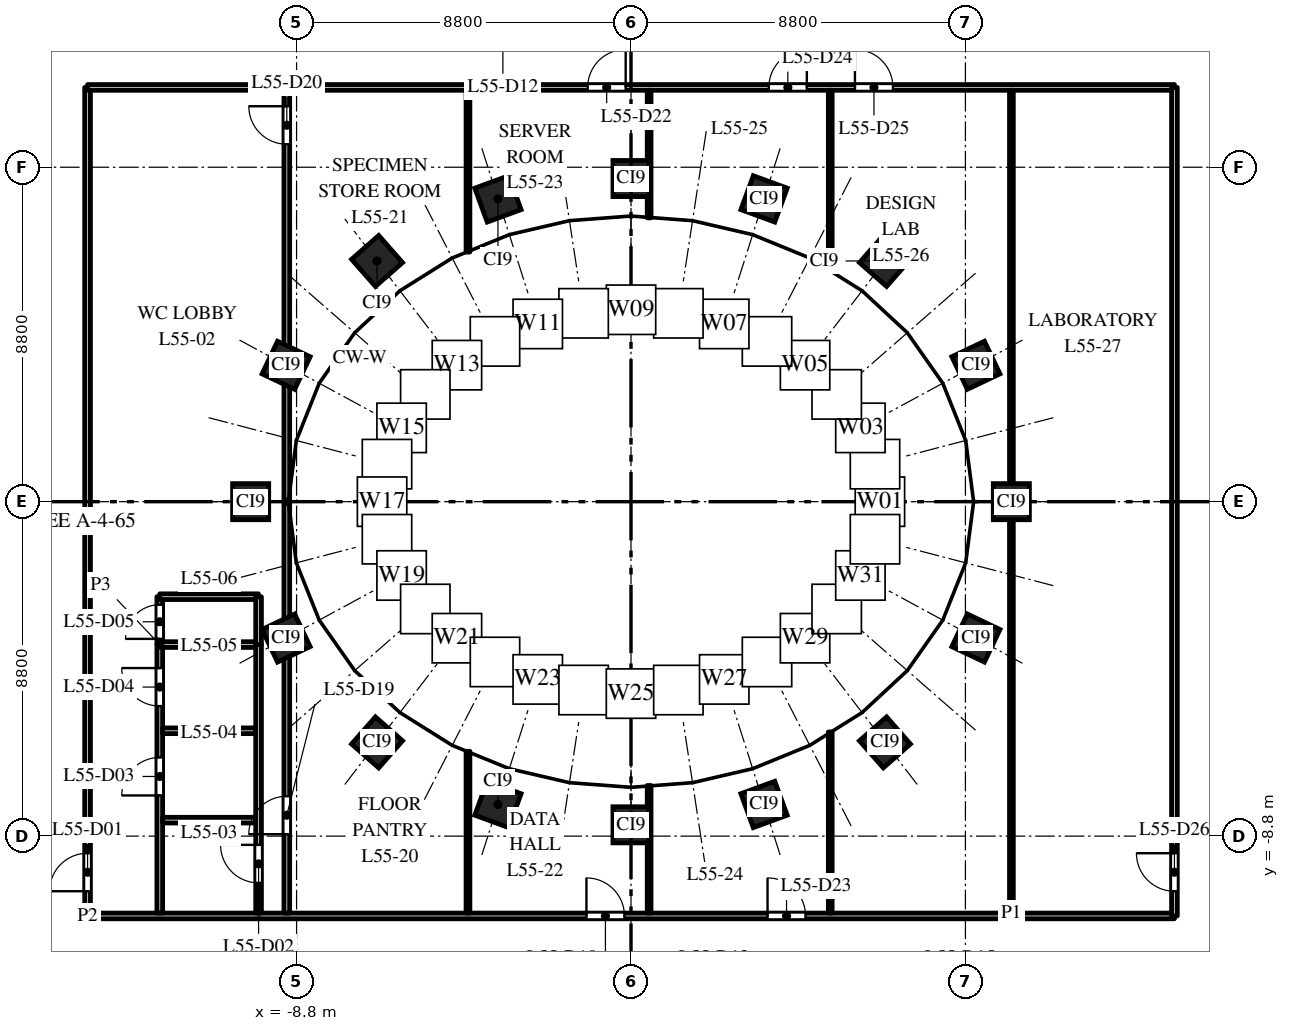
"""IFC4 building model, lengths in metres.
Left out: names, types, materials, properties, quantities, classifications, styles, units other than length and angle.
Written with IfcOpenShell. Run it as: python <this file> out.ifc"""

import sys

from ifc_helpers import new_model, si_unit, direction, frame, frame_2d, origin, origin_2d, place, context, subcontext, project, spatial, rectangle, extrude, element, fill, save


model = new_model("IFC4")
c1 = context("Model", 3, precision=1e-05, world=origin(), true_north=direction((0.0, 1.0)))
c2 = subcontext(c1, "Body", "Model", "MODEL_VIEW")
j1 = project(units=[si_unit("LENGTHUNIT", "METRE"), si_unit("PLANEANGLEUNIT", "RADIAN")], contexts=[c1])
p1 = place(None, origin())
s1 = spatial("IfcSite", under=j1, at=p1, CompositionType="ELEMENT")
p2 = place(p1, origin())
s2 = spatial("IfcBuilding", under=s1, at=p2, CompositionType="ELEMENT")
p3 = place(p2, frame((0.0, 0.0, 261.5)))
s3 = spatial("IfcBuildingStorey", under=s2, at=p3, CompositionType="ELEMENT", Elevation=261.5)
for number, where, z_axis, x_axis in (
    (1, (10.008, 0.0, 0.0), (0.0, 0.0, 1.0), (0.0, 1.0, 0.0)),
    (2, (9.076, 3.588, 0.0), (0.0, 0.0, 1.0), (-0.429, 0.903, 0.0)),
    (3, (6.682, 6.334, 0.0), (0.0, 0.0, 1.0), (-0.751, 0.66, 0.0)),
    (4, (3.501, 7.967, 0.0), (0.0, 0.0, 1.0), (-0.939, 0.344, 0.0)),
    (5, (0.0, 8.503, 0.0), (0.0, 0.0, 1.0), (-1.0, 0.0, 0.0)),
    (6, (-3.501, 7.967, 0.0), (0.0, 0.0, 1.0), (-0.939, -0.344, 0.0)),
    (7, (-6.682, 6.334, 0.0), (0.0, 0.0, 1.0), (-0.751, -0.66, 0.0)),
    (8, (-9.076, 3.588, 0.0), (0.0, 0.0, 1.0), (-0.429, -0.903, 0.0)),
    (9, (-10.008, 0.0, 0.0), (0.0, 0.0, 1.0), (0.0, -1.0, 0.0)),
    (10, (-9.076, -3.588, 0.0), (0.0, 0.0, 1.0), (0.429, -0.903, 0.0)),
    (11, (-6.682, -6.334, 0.0), (0.0, 0.0, 1.0), (0.751, -0.66, 0.0)),
    (12, (-3.501, -7.967, 0.0), (0.0, 0.0, 1.0), (0.939, -0.344, 0.0)),
    (13, (0.0, -8.503, 0.0), (0.0, 0.0, 1.0), (1.0, 0.0, 0.0)),
    (14, (3.501, -7.967, 0.0), (0.0, 0.0, 1.0), (0.939, 0.344, 0.0)),
    (15, (6.682, -6.334, 0.0), (0.0, 0.0, 1.0), (0.751, 0.66, 0.0)),
    (16, (9.076, -3.588, 0.0), (0.0, 0.0, 1.0), (0.429, 0.903, 0.0)),
):
    element("IfcColumn", number, at=place(p3, frame(where, z_axis=z_axis, x_axis=x_axis)), inside=s3, PredefinedType="COLUMN", context=c2, shape_type="SweptSolid", body=[
        extrude(rectangle(XDim=0.95, YDim=0.95, at=origin_2d()), origin(), (0.0, 0.0, 1.0), 4.0),
    ])
p4 = place(p3, frame((-14.3, -10.9, 0.0), z_axis=(0.0, 0.0, 1.0), x_axis=(0.0, 1.0, 0.0)))
e17 = element("IfcWall", 17, at=p4, inside=s3, PredefinedType="PARTITIONING", context=c2, shape_type="SweptSolid", body=[
    extrude(rectangle(XDim=21.8, YDim=0.15, at=frame_2d((10.9, 0.0))), origin(), (0.0, 0.0, 1.0), 2.75),
])
p5 = place(p4, frame((0.65, 0.0, 0.0)))
e18 = element("IfcOpeningElement", 18, at=p5, cuts=e17, PredefinedType="OPENING", context=c2, shape_type="SweptSolid", body=[
    extrude(rectangle(XDim=1.0, YDim=2.1, at=frame_2d((0.5, 1.05))), frame((0.0, 0.085, 0.0), z_axis=(0.0, -1.0, 0.0), x_axis=(1.0, 0.0, 0.0)), (0.0, 0.0, 1.0), 0.17),
])
p6 = place(p3, frame((-14.3, -10.9, 0.0), z_axis=(0.0, 0.0, 1.0), x_axis=(1.0, 0.0, 0.0)))
e19 = element("IfcWall", 19, at=p6, inside=s3, PredefinedType="PARTITIONING", context=c2, shape_type="SweptSolid", body=[
    extrude(rectangle(XDim=28.6, YDim=0.15, at=frame_2d((14.3, 0.0))), origin(), (0.0, 0.0, 1.0), 2.85),
])
p7 = place(p6, frame((13.127, 0.0, 0.0)))
e20 = element("IfcOpeningElement", 20, at=p7, cuts=e19, PredefinedType="OPENING", context=c2, shape_type="SweptSolid", body=[
    extrude(rectangle(XDim=1.0, YDim=2.1, at=frame_2d((0.5, 1.05))), frame((0.0, 0.085, 0.0), z_axis=(0.0, -1.0, 0.0), x_axis=(1.0, 0.0, 0.0)), (0.0, 0.0, 1.0), 0.17),
])
p8 = place(p6, frame((17.893, 0.0, 0.0)))
e21 = element("IfcOpeningElement", 21, at=p8, cuts=e19, PredefinedType="OPENING", context=c2, shape_type="SweptSolid", body=[
    extrude(rectangle(XDim=1.0, YDim=2.1, at=frame_2d((0.5, 1.05))), frame((0.0, 0.085, 0.0), z_axis=(0.0, -1.0, 0.0), x_axis=(1.0, 0.0, 0.0)), (0.0, 0.0, 1.0), 0.17),
])
p9 = place(p3, frame((-14.3, 10.9, 0.0), z_axis=(0.0, 0.0, 1.0), x_axis=(1.0, 0.0, 0.0)))
e22 = element("IfcWall", 22, at=p9, inside=s3, PredefinedType="PARTITIONING", context=c2, shape_type="SweptSolid", body=[
    extrude(rectangle(XDim=28.6, YDim=0.15, at=frame_2d((14.3, 0.0))), origin(), (0.0, 0.0, 1.0), 2.85),
])
p10 = place(p9, frame((13.16, 0.0, 0.0)))
e23 = element("IfcOpeningElement", 23, at=p10, cuts=e22, PredefinedType="OPENING", context=c2, shape_type="SweptSolid", body=[
    extrude(rectangle(XDim=1.0, YDim=2.1, at=frame_2d((0.5, 1.05))), frame((0.0, 0.085, 0.0), z_axis=(0.0, -1.0, 0.0), x_axis=(1.0, 0.0, 0.0)), (0.0, 0.0, 1.0), 0.17),
])
p11 = place(p9, frame((17.927, 0.0, 0.0)))
e24 = element("IfcOpeningElement", 24, at=p11, cuts=e22, PredefinedType="OPENING", context=c2, shape_type="SweptSolid", body=[
    extrude(rectangle(XDim=1.0, YDim=2.1, at=frame_2d((0.5, 1.05))), frame((0.0, 0.085, 0.0), z_axis=(0.0, -1.0, 0.0), x_axis=(1.0, 0.0, 0.0)), (0.0, 0.0, 1.0), 0.17),
])
p12 = place(p9, frame((20.193, 0.0, 0.0)))
e25 = element("IfcOpeningElement", 25, at=p12, cuts=e22, PredefinedType="OPENING", context=c2, shape_type="SweptSolid", body=[
    extrude(rectangle(XDim=1.0, YDim=2.1, at=frame_2d((0.5, 1.05))), frame((0.0, 0.085, 0.0), z_axis=(0.0, -1.0, 0.0), x_axis=(1.0, 0.0, 0.0)), (0.0, 0.0, 1.0), 0.17),
])
p13 = place(p3, frame((-12.4, -10.825, 0.0), z_axis=(0.0, 0.0, 1.0), x_axis=(0.0, 1.0, 0.0)))
e26 = element("IfcWall", 26, at=p13, inside=s3, PredefinedType="PARTITIONING", context=c2, shape_type="SweptSolid", body=[
    extrude(rectangle(XDim=7.065, YDim=0.15, at=frame_2d((3.532, 0.0))), origin(), (0.0, 0.0, 1.0), 2.75),
])
p14 = place(p13, frame((3.095, 0.0, 0.0)))
e27 = element("IfcOpeningElement", 27, at=p14, cuts=e26, PredefinedType="OPENING", context=c2, shape_type="SweptSolid", body=[
    extrude(rectangle(XDim=1.0, YDim=2.1, at=frame_2d((0.5, 1.05))), frame((0.0, 0.085, 0.0), z_axis=(0.0, -1.0, 0.0), x_axis=(1.0, 0.0, 0.0)), (0.0, 0.0, 1.0), 0.17),
])
p15 = place(p13, frame((5.447, 0.0, 0.0)))
e28 = element("IfcOpeningElement", 28, at=p15, cuts=e26, PredefinedType="OPENING", context=c2, shape_type="SweptSolid", body=[
    extrude(rectangle(XDim=1.0, YDim=2.1, at=frame_2d((0.5, 1.05))), frame((0.0, 0.085, 0.0), z_axis=(0.0, -1.0, 0.0), x_axis=(1.0, 0.0, 0.0)), (0.0, 0.0, 1.0), 0.17),
])
p16 = place(p3, frame((-12.325, -8.38, 0.0), z_axis=(0.0, 0.0, 1.0), x_axis=(1.0, 0.0, 0.0)))
e29 = element("IfcWall", 29, at=p16, inside=s3, PredefinedType="PARTITIONING", context=c2, shape_type="SweptSolid", body=[
    extrude(rectangle(XDim=2.45, YDim=0.15, at=frame_2d((1.225, 0.0))), origin(), (0.0, 0.0, 1.0), 2.75),
])
p17 = place(p3, frame((-12.325, -6.028, 0.0), z_axis=(0.0, 0.0, 1.0), x_axis=(1.0, 0.0, 0.0)))
e30 = element("IfcWall", 30, at=p17, inside=s3, PredefinedType="PARTITIONING", context=c2, shape_type="SweptSolid", body=[
    extrude(rectangle(XDim=2.45, YDim=0.15, at=frame_2d((1.225, 0.0))), origin(), (0.0, 0.0, 1.0), 3.7),
])
p18 = place(p3, frame((-12.4, -3.76, 0.0), z_axis=(0.0, 0.0, 1.0), x_axis=(0.0, 1.0, 0.0)))
e31 = element("IfcWall", 31, at=p18, inside=s3, PredefinedType="PARTITIONING", context=c2, shape_type="SweptSolid", body=[
    extrude(rectangle(XDim=1.26, YDim=0.15, at=frame_2d((0.63, 0.0))), origin(), (0.0, 0.0, 1.0), 3.7),
])
p19 = place(p18, frame((0.15, 0.0, 0.0)))
e32 = element("IfcOpeningElement", 32, at=p19, cuts=e31, PredefinedType="OPENING", context=c2, shape_type="SweptSolid", body=[
    extrude(rectangle(XDim=0.9, YDim=2.1, at=frame_2d((0.45, 1.05))), frame((0.0, 0.085, 0.0), z_axis=(0.0, -1.0, 0.0), x_axis=(1.0, 0.0, 0.0)), (0.0, 0.0, 1.0), 0.17),
])
p20 = place(p3, frame((-12.4, -3.76, 0.0), z_axis=(0.0, 0.0, 1.0), x_axis=(1.0, 0.0, 0.0)))
e33 = element("IfcWall", 33, at=p20, inside=s3, PredefinedType="PARTITIONING", context=c2, shape_type="SweptSolid", body=[
    extrude(rectangle(XDim=2.6, YDim=0.15, at=frame_2d((1.3, 0.0))), origin(), (0.0, 0.0, 1.0), 3.7),
])
p21 = place(p3, frame((-12.4, -2.5, 0.0), z_axis=(0.0, 0.0, 1.0), x_axis=(1.0, 0.0, 0.0)))
e34 = element("IfcWall", 34, at=p21, inside=s3, PredefinedType="PARTITIONING", context=c2, shape_type="SweptSolid", body=[
    extrude(rectangle(XDim=2.596, YDim=0.15, at=frame_2d((1.298, 0.0))), origin(), (0.0, 0.0, 1.0), 3.7),
])
p22 = place(p3, frame((-9.8, -10.825, 0.0), z_axis=(0.0, 0.0, 1.0), x_axis=(0.0, 1.0, 0.0)))
e35 = element("IfcWall", 35, at=p22, inside=s3, PredefinedType="PARTITIONING", context=c2, shape_type="SweptSolid", body=[
    extrude(rectangle(XDim=7.065, YDim=0.15, at=frame_2d((3.532, 0.0))), origin(), (0.0, 0.0, 1.0), 2.75),
])
p23 = place(p22, frame((0.795, 0.0, 0.0)))
e36 = element("IfcOpeningElement", 36, at=p23, cuts=e35, PredefinedType="OPENING", context=c2, shape_type="SweptSolid", body=[
    extrude(rectangle(XDim=1.0, YDim=2.1, at=frame_2d((0.5, 1.05))), frame((0.0, 0.085, 0.0), z_axis=(0.0, -1.0, 0.0), x_axis=(1.0, 0.0, 0.0)), (0.0, 0.0, 1.0), 0.17),
])
p24 = place(p3, frame((-9.8, -3.76, 0.0), z_axis=(0.0, 0.0, 1.0), x_axis=(0.0, 1.0, 0.0)))
e37 = element("IfcWall", 37, at=p24, inside=s3, PredefinedType="PARTITIONING", context=c2, shape_type="SweptSolid", body=[
    extrude(rectangle(XDim=1.256, YDim=0.15, at=frame_2d((0.628, 0.0))), origin(), (0.0, 0.0, 1.0), 3.7),
])
p25 = place(p3, frame((-9.057, -10.825, 0.0), z_axis=(0.0, 0.0, 1.0), x_axis=(0.0, 1.0, 0.0)))
e38 = element("IfcWall", 38, at=p25, inside=s3, PredefinedType="PARTITIONING", context=c2, shape_type="SweptSolid", body=[
    extrude(rectangle(XDim=10.78, YDim=0.15, at=frame_2d((5.39, 0.0))), origin(), (0.0, 0.0, 1.0), 2.75),
])
p26 = place(p25, frame((2.075, 0.0, 0.0)))
e39 = element("IfcOpeningElement", 39, at=p26, cuts=e38, PredefinedType="OPENING", context=c2, shape_type="SweptSolid", body=[
    extrude(rectangle(XDim=1.0, YDim=2.1, at=frame_2d((0.5, 1.05))), frame((0.0, 0.085, 0.0), z_axis=(0.0, -1.0, 0.0), x_axis=(1.0, 0.0, 0.0)), (0.0, 0.0, 1.0), 0.17),
])
p27 = place(p3, frame((-9.057, 0.045, 0.0), z_axis=(0.0, 0.0, 1.0), x_axis=(0.0, 1.0, 0.0)))
e40 = element("IfcWall", 40, at=p27, inside=s3, PredefinedType="PARTITIONING", context=c2, shape_type="SweptSolid", body=[
    extrude(rectangle(XDim=10.78, YDim=0.15, at=frame_2d((5.39, 0.0))), origin(), (0.0, 0.0, 1.0), 2.75),
])
p28 = place(p27, frame((9.36, 0.0, 0.0)))
e41 = element("IfcOpeningElement", 41, at=p28, cuts=e40, PredefinedType="OPENING", context=c2, shape_type="SweptSolid", body=[
    extrude(rectangle(XDim=1.0, YDim=2.1, at=frame_2d((0.5, 1.05))), frame((0.0, 0.085, 0.0), z_axis=(0.0, -1.0, 0.0), x_axis=(1.0, 0.0, 0.0)), (0.0, 0.0, 1.0), 0.17),
])
for number, where, z_axis, x_axis in (
    (42, (-4.29, -10.825, 0.0), (0.0, 0.0, 1.0), (0.0, 1.0, 0.0)),
    (43, (-4.29, 6.568, 0.0), (0.0, 0.0, 1.0), (0.0, 1.0, 0.0)),
):
    element("IfcWall", number, at=place(p3, frame(where, z_axis=z_axis, x_axis=x_axis)), inside=s3, PredefinedType="PARTITIONING", context=c2, shape_type="SweptSolid", body=[
        extrude(rectangle(XDim=4.257, YDim=0.1, at=frame_2d((2.128, 0.0))), origin(), (0.0, 0.0, 1.0), 2.85),
    ])
for number, where, z_axis, x_axis in (
    (44, (0.477, -10.825, 0.0), (0.0, 0.0, 1.0), (0.0, 1.0, 0.0)),
    (45, (0.477, 7.468, 0.0), (0.0, 0.0, 1.0), (0.0, 1.0, 0.0)),
):
    element("IfcWall", number, at=place(p3, frame(where, z_axis=z_axis, x_axis=x_axis)), inside=s3, PredefinedType="PARTITIONING", context=c2, shape_type="SweptSolid", body=[
        extrude(rectangle(XDim=3.357, YDim=0.1, at=frame_2d((1.678, 0.0))), origin(), (0.0, 0.0, 1.0), 3.0),
    ])
for number, where, z_axis, x_axis in (
    (46, (5.243, -10.825, 0.0), (0.0, 0.0, 1.0), (0.0, 1.0, 0.0)),
    (47, (5.243, 6.059, 0.0), (0.0, 0.0, 1.0), (0.0, 1.0, 0.0)),
):
    element("IfcWall", number, at=place(p3, frame(where, z_axis=z_axis, x_axis=x_axis)), inside=s3, PredefinedType="PARTITIONING", context=c2, shape_type="SweptSolid", body=[
        extrude(rectangle(XDim=4.766, YDim=0.1, at=frame_2d((2.383, 0.0))), origin(), (0.0, 0.0, 1.0), 2.85),
    ])
p29 = place(p3, frame((10.01, -10.825, 0.0), z_axis=(0.0, 0.0, 1.0), x_axis=(0.0, 1.0, 0.0)))
e48 = element("IfcWall", 48, at=p29, inside=s3, PredefinedType="PARTITIONING", context=c2, shape_type="SweptSolid", body=[
    extrude(rectangle(XDim=21.65, YDim=0.1, at=frame_2d((10.825, 0.0))), origin(), (0.0, 0.0, 1.0), 2.75),
])
p30 = place(p3, frame((14.3, -10.9, 0.0), z_axis=(0.0, 0.0, 1.0), x_axis=(0.0, 1.0, 0.0)))
e49 = element("IfcWall", 49, at=p30, inside=s3, PredefinedType="PARTITIONING", context=c2, shape_type="SweptSolid", body=[
    extrude(rectangle(XDim=21.8, YDim=0.15, at=frame_2d((10.9, 0.0))), origin(), (0.0, 0.0, 1.0), 2.75),
])
p31 = place(p30, frame((0.65, 0.0, 0.0)))
e50 = element("IfcOpeningElement", 50, at=p31, cuts=e49, PredefinedType="OPENING", context=c2, shape_type="SweptSolid", body=[
    extrude(rectangle(XDim=1.0, YDim=2.1, at=frame_2d((0.5, 1.05))), frame((0.0, 0.085, 0.0), z_axis=(0.0, -1.0, 0.0), x_axis=(1.0, 0.0, 0.0)), (0.0, 0.0, 1.0), 0.17),
])
p32 = place(p5, origin())
e51 = element("IfcDoor", 51, at=p32, inside=s3, OperationType="SINGLE_SWING_LEFT", PredefinedType="DOOR", context=c2, shape_type="SweptSolid", body=[
    extrude(rectangle(XDim=1.0, YDim=2.1, at=frame_2d((0.5, 1.05))), frame((0.0, 0.025, 0.0), z_axis=(0.0, -1.0, 0.0), x_axis=(1.0, 0.0, 0.0)), (0.0, 0.0, 1.0), 0.05),
])
fill(e18, e51)
p33 = place(p23, origin())
e52 = element("IfcDoor", 52, at=p33, inside=s3, OperationType="SINGLE_SWING_RIGHT", PredefinedType="DOOR", context=c2, shape_type="SweptSolid", body=[
    extrude(rectangle(XDim=1.0, YDim=2.1, at=frame_2d((0.5, 1.05))), frame((0.0, 0.025, 0.0), z_axis=(0.0, -1.0, 0.0), x_axis=(1.0, 0.0, 0.0)), (0.0, 0.0, 1.0), 0.05),
])
fill(e36, e52)
p34 = place(p14, origin())
e53 = element("IfcDoor", 53, at=p34, inside=s3, OperationType="SINGLE_SWING_LEFT", PredefinedType="DOOR", context=c2, shape_type="SweptSolid", body=[
    extrude(rectangle(XDim=1.0, YDim=2.1, at=frame_2d((0.5, 1.05))), frame((0.0, 0.025, 0.0), z_axis=(0.0, -1.0, 0.0), x_axis=(1.0, 0.0, 0.0)), (0.0, 0.0, 1.0), 0.05),
])
fill(e27, e53)
p35 = place(p15, origin())
e54 = element("IfcDoor", 54, at=p35, inside=s3, OperationType="SINGLE_SWING_RIGHT", PredefinedType="DOOR", context=c2, shape_type="SweptSolid", body=[
    extrude(rectangle(XDim=1.0, YDim=2.1, at=frame_2d((0.5, 1.05))), frame((0.0, 0.025, 0.0), z_axis=(0.0, -1.0, 0.0), x_axis=(1.0, 0.0, 0.0)), (0.0, 0.0, 1.0), 0.05),
])
fill(e28, e54)
p36 = place(p19, origin())
e55 = element("IfcDoor", 55, at=p36, inside=s3, OperationType="SINGLE_SWING_LEFT", PredefinedType="DOOR", context=c2, shape_type="SweptSolid", body=[
    extrude(rectangle(XDim=0.9, YDim=2.1, at=frame_2d((0.45, 1.05))), frame((0.0, 0.025, 0.0), z_axis=(0.0, -1.0, 0.0), x_axis=(1.0, 0.0, 0.0)), (0.0, 0.0, 1.0), 0.05),
])
fill(e32, e55)
p37 = place(p26, origin())
e56 = element("IfcDoor", 56, at=p37, inside=s3, OperationType="SINGLE_SWING_LEFT", PredefinedType="DOOR", context=c2, shape_type="SweptSolid", body=[
    extrude(rectangle(XDim=1.0, YDim=2.1, at=frame_2d((0.5, 1.05))), frame((0.0, 0.025, 0.0), z_axis=(0.0, -1.0, 0.0), x_axis=(1.0, 0.0, 0.0)), (0.0, 0.0, 1.0), 0.05),
])
fill(e39, e56)
p38 = place(p28, origin())
e57 = element("IfcDoor", 57, at=p38, inside=s3, OperationType="SINGLE_SWING_RIGHT", PredefinedType="DOOR", context=c2, shape_type="SweptSolid", body=[
    extrude(rectangle(XDim=1.0, YDim=2.1, at=frame_2d((0.5, 1.05))), frame((0.0, 0.025, 0.0), z_axis=(0.0, -1.0, 0.0), x_axis=(1.0, 0.0, 0.0)), (0.0, 0.0, 1.0), 0.05),
])
fill(e41, e57)
p39 = place(p7, origin())
e58 = element("IfcDoor", 58, at=p39, inside=s3, OperationType="SINGLE_SWING_LEFT", PredefinedType="DOOR", context=c2, shape_type="SweptSolid", body=[
    extrude(rectangle(XDim=1.0, YDim=2.1, at=frame_2d((0.5, 1.05))), frame((0.0, 0.025, 0.0), z_axis=(0.0, -1.0, 0.0), x_axis=(1.0, 0.0, 0.0)), (0.0, 0.0, 1.0), 0.05),
])
fill(e20, e58)
p40 = place(p10, origin())
e59 = element("IfcDoor", 59, at=p40, inside=s3, OperationType="SINGLE_SWING_RIGHT", PredefinedType="DOOR", context=c2, shape_type="SweptSolid", body=[
    extrude(rectangle(XDim=1.0, YDim=2.1, at=frame_2d((0.5, 1.05))), frame((0.0, 0.025, 0.0), z_axis=(0.0, -1.0, 0.0), x_axis=(1.0, 0.0, 0.0)), (0.0, 0.0, 1.0), 0.05),
])
fill(e23, e59)
p41 = place(p8, origin())
e60 = element("IfcDoor", 60, at=p41, inside=s3, OperationType="SINGLE_SWING_LEFT", PredefinedType="DOOR", context=c2, shape_type="SweptSolid", body=[
    extrude(rectangle(XDim=1.0, YDim=2.1, at=frame_2d((0.5, 1.05))), frame((0.0, 0.025, 0.0), z_axis=(0.0, -1.0, 0.0), x_axis=(1.0, 0.0, 0.0)), (0.0, 0.0, 1.0), 0.05),
])
fill(e21, e60)
p42 = place(p11, origin())
e61 = element("IfcDoor", 61, at=p42, inside=s3, OperationType="SINGLE_SWING_RIGHT", PredefinedType="DOOR", context=c2, shape_type="SweptSolid", body=[
    extrude(rectangle(XDim=1.0, YDim=2.1, at=frame_2d((0.5, 1.05))), frame((0.0, 0.025, 0.0), z_axis=(0.0, -1.0, 0.0), x_axis=(1.0, 0.0, 0.0)), (0.0, 0.0, 1.0), 0.05),
])
fill(e24, e61)
p43 = place(p12, origin())
e62 = element("IfcDoor", 62, at=p43, inside=s3, OperationType="SINGLE_SWING_LEFT", PredefinedType="DOOR", context=c2, shape_type="SweptSolid", body=[
    extrude(rectangle(XDim=1.0, YDim=2.1, at=frame_2d((0.5, 1.05))), frame((0.0, 0.025, 0.0), z_axis=(0.0, -1.0, 0.0), x_axis=(1.0, 0.0, 0.0)), (0.0, 0.0, 1.0), 0.05),
])
fill(e25, e62)
p44 = place(p31, origin())
e63 = element("IfcDoor", 63, at=p44, inside=s3, OperationType="SINGLE_SWING_RIGHT", PredefinedType="DOOR", context=c2, shape_type="SweptSolid", body=[
    extrude(rectangle(XDim=1.0, YDim=2.1, at=frame_2d((0.5, 1.05))), frame((0.0, 0.025, 0.0), z_axis=(0.0, -1.0, 0.0), x_axis=(1.0, 0.0, 0.0)), (0.0, 0.0, 1.0), 0.05),
])
fill(e50, e63)
save(model, sys.argv[1])
